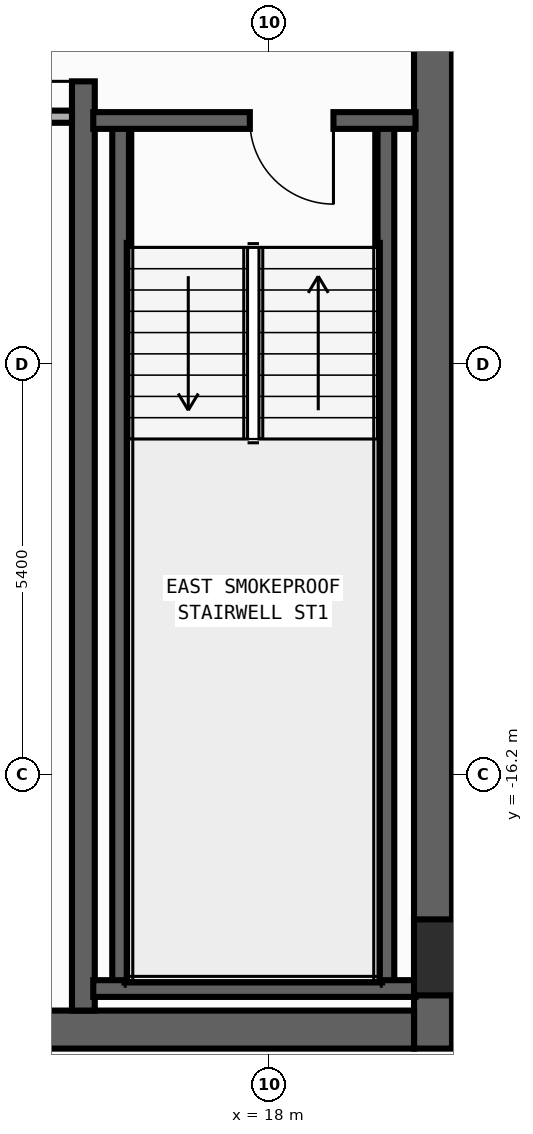
"""IFC4 building model, lengths in metres.
Left out: names, types, materials, properties, quantities, classifications, styles, units other than length and angle.
Written with IfcOpenShell. Run it as: python <this file> out.ifc"""

import sys

from ifc_helpers import new_model, si_unit, direction, frame, frame_2d, origin, origin_2d, place, context, subcontext, project, spatial, rectangle, circle, extrude, element, fill, save


model = new_model("IFC4")
c1 = context("Model", 3, precision=1e-05, world=origin(), true_north=direction((0.0, 1.0)))
c2 = subcontext(c1, "Body", "Model", "MODEL_VIEW")
j1 = project(units=[si_unit("LENGTHUNIT", "METRE"), si_unit("PLANEANGLEUNIT", "RADIAN")], contexts=[c1])
p1 = place(None, origin())
s1 = spatial("IfcSite", under=j1, at=p1, CompositionType="ELEMENT")
p2 = place(p1, origin())
s2 = spatial("IfcBuilding", under=s1, at=p2, CompositionType="ELEMENT")
p3 = place(p2, frame((0.0, 0.0, 304.2)))
s3 = spatial("IfcBuildingStorey", under=s2, at=p3, CompositionType="ELEMENT", Elevation=304.2)
p4 = place(p3, frame((20.15, -19.8, 0.0), z_axis=(0.0, 0.0, 1.0), x_axis=(0.0, 1.0, 0.0)))
e1 = element("IfcWall", 1, at=p4, inside=s3, PredefinedType="SHEAR", context=c2, shape_type="SweptSolid", body=[
    extrude(rectangle(XDim=27.0, YDim=0.5, at=frame_2d((13.5, 0.0))), origin(), (0.0, 0.0, 1.0), 3.54),
])
p5 = place(p3, frame((12.5, -19.55, 0.0), z_axis=(0.0, 0.0, 1.0), x_axis=(1.0, 0.0, 0.0)))
e2 = element("IfcWall", 2, at=p5, inside=s3, PredefinedType="SHEAR", context=c2, shape_type="SweptSolid", body=[
    extrude(rectangle(XDim=7.4, YDim=0.5, at=frame_2d((3.7, 0.0))), origin(), (0.0, 0.0, 1.0), 3.54),
])
p6 = place(p3, frame((15.55, -19.3, 0.0), z_axis=(0.0, 0.0, 1.0), x_axis=(0.0, 1.0, 0.0)))
e3 = element("IfcWall", 3, at=p6, inside=s3, PredefinedType="SHEAR", context=c2, shape_type="SweptSolid", body=[
    extrude(rectangle(XDim=26.0, YDim=0.3, at=frame_2d((13.0, 0.0))), origin(), (0.0, 0.0, 1.0), 3.54),
])
p7 = place(p6, frame((12.225, 0.0, 0.0)))
e4 = element("IfcOpeningElement", 4, at=p7, cuts=e3, PredefinedType="OPENING", context=c2, shape_type="SweptSolid", body=[
    extrude(rectangle(XDim=1.15, YDim=2.2, at=frame_2d((0.575, 1.1))), frame((0.0, 0.16, 0.0), z_axis=(0.0, -1.0, 0.0), x_axis=(1.0, 0.0, 0.0)), (0.0, 0.0, 1.0), 0.32),
])
p8 = place(p6, frame((24.625, 0.0, 0.0)))
e5 = element("IfcOpeningElement", 5, at=p8, cuts=e3, PredefinedType="OPENING", context=c2, shape_type="SweptSolid", body=[
    extrude(rectangle(XDim=0.85, YDim=2.1, at=frame_2d((0.425, 1.05))), frame((0.0, 0.16, 0.0), z_axis=(0.0, -1.0, 0.0), x_axis=(1.0, 0.0, 0.0)), (0.0, 0.0, 1.0), 0.32),
])
for number, where, z_axis, x_axis in (
    (6, (16.04, -19.01, 0.0), (0.0, 0.0, 1.0), (0.0, 1.0, 0.0)),
    (7, (19.53, -19.01, 0.0), (0.0, 0.0, 1.0), (0.0, 1.0, 0.0)),
):
    element("IfcWall", number, at=place(p3, frame(where, z_axis=z_axis, x_axis=x_axis)), inside=s3, PredefinedType="SHEAR", context=c2, shape_type="SweptSolid", body=[
        extrude(rectangle(XDim=11.42, YDim=0.22, at=frame_2d((5.71, 0.0))), origin(), (0.0, 0.0, 1.0), 3.54),
    ])
p9 = place(p3, frame((15.68, -19.01, 0.0), z_axis=(0.0, 0.0, 1.0), x_axis=(1.0, 0.0, 0.0)))
e8 = element("IfcWall", 8, at=p9, inside=s3, PredefinedType="SHEAR", context=c2, shape_type="SweptSolid", body=[
    extrude(rectangle(XDim=4.24, YDim=0.22, at=frame_2d((2.12, 0.0))), origin(), (0.0, 0.0, 1.0), 3.54),
])
p10 = place(p3, frame((19.92, -7.59, 0.0), z_axis=(0.0, 0.0, 1.0), x_axis=(-1.0, 0.0, 0.0)))
e9 = element("IfcWall", 9, at=p10, inside=s3, PredefinedType="SHEAR", context=c2, shape_type="SweptSolid", body=[
    extrude(rectangle(XDim=4.24, YDim=0.22, at=frame_2d((2.12, 0.0))), origin(), (0.0, 0.0, 1.0), 3.54),
])
p11 = place(p10, frame((1.08, 0.0, 0.0)))
e10 = element("IfcOpeningElement", 10, at=p11, cuts=e9, PredefinedType="OPENING", context=c2, shape_type="SweptSolid", body=[
    extrude(rectangle(XDim=1.1, YDim=2.2, at=frame_2d((0.55, 1.1))), frame((0.0, 0.12, 0.0), z_axis=(0.0, -1.0, 0.0), x_axis=(1.0, 0.0, 0.0)), (0.0, 0.0, 1.0), 0.24),
])
p12 = place(p3, frame((20.4, -18.6, 0.0), z_axis=(0.0, 0.0, 1.0), x_axis=(1.0, 0.0, 0.0)))
e11 = element("IfcColumn", 11, at=p12, inside=s3, PredefinedType="COLUMN", context=c2, shape_type="SweptSolid", body=[
    extrude(circle(Radius=0.5, at=origin_2d()), origin(), (0.0, 0.0, 1.0), 3.8),
])
p13 = place(p3, frame((12.8, -7.54, 0.0), z_axis=(0.0, 0.0, 1.0), x_axis=(1.0, 0.0, 0.0)))
e12 = element("IfcWall", 12, at=p13, inside=s3, PredefinedType="STANDARD", context=c2, shape_type="SweptSolid", body=[
    extrude(rectangle(XDim=2.6, YDim=0.16, at=frame_2d((1.3, 0.0))), origin(), (0.0, 0.0, 1.0), 3.54),
])
p14 = place(p11, origin())
e13 = element("IfcDoor", 13, at=p14, inside=s3, OperationType="SINGLE_SWING_LEFT", PredefinedType="DOOR", context=c2, shape_type="SweptSolid", body=[
    extrude(rectangle(XDim=1.1, YDim=2.2, at=frame_2d((0.55, 1.1))), frame((0.0, 0.025, 0.0), z_axis=(0.0, -1.0, 0.0), x_axis=(1.0, 0.0, 0.0)), (0.0, 0.0, 1.0), 0.05),
])
fill(e10, e13)
p15 = place(p7, origin())
e14 = element("IfcDoor", 14, at=p15, inside=s3, OperationType="SINGLE_SWING_LEFT", PredefinedType="DOOR", context=c2, shape_type="SweptSolid", body=[
    extrude(rectangle(XDim=1.15, YDim=2.2, at=frame_2d((0.575, 1.1))), frame((0.0, 0.025, 0.0), z_axis=(0.0, -1.0, 0.0), x_axis=(1.0, 0.0, 0.0)), (0.0, 0.0, 1.0), 0.05),
])
fill(e4, e14)
save(model, sys.argv[1])
